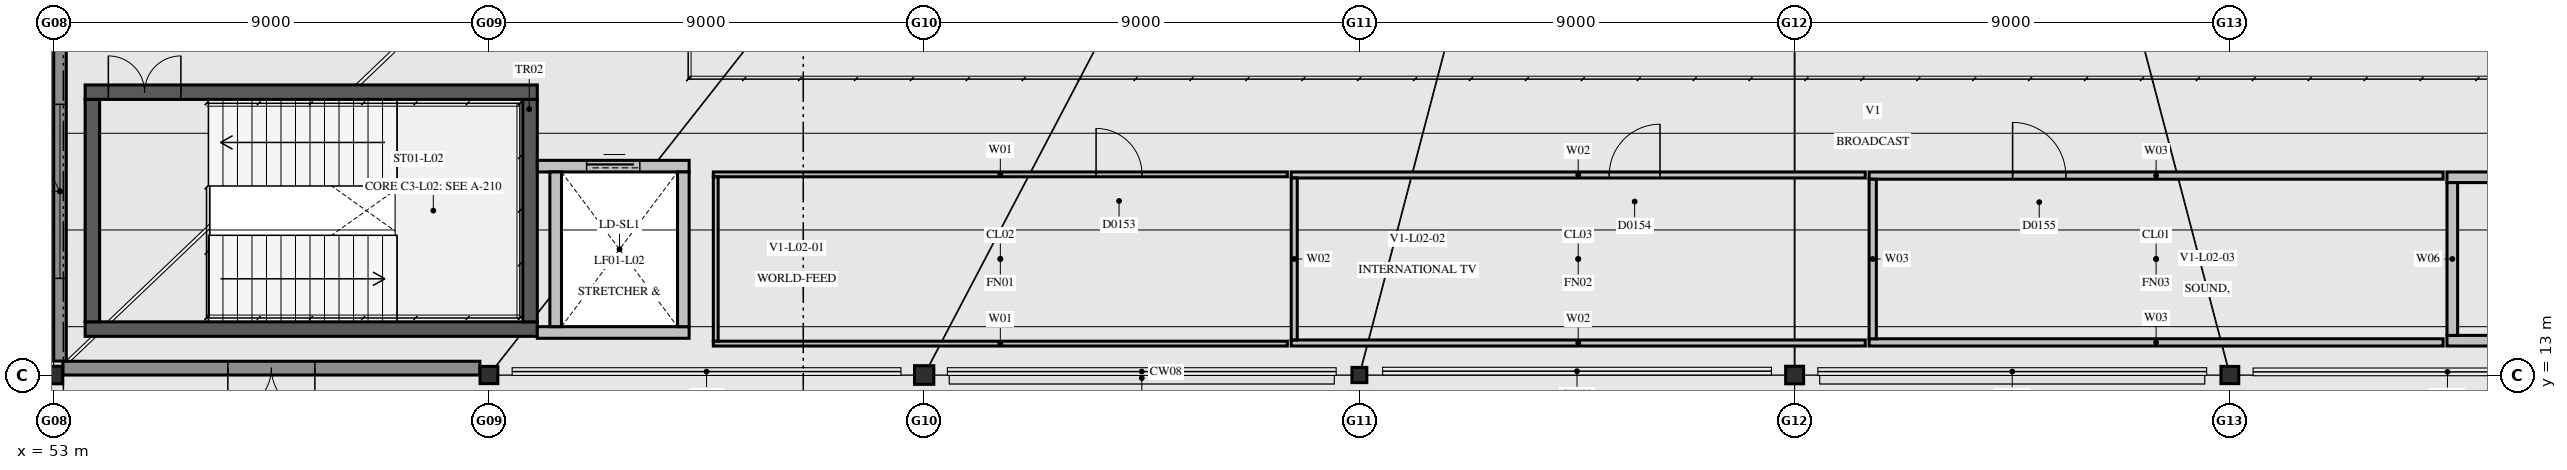
"""IFC4 building model, lengths in metres.
Left out: names, types, materials, properties, quantities, classifications, styles, units other than length and angle.
Written with IfcOpenShell. Run it as: python <this file> out.ifc"""

import sys

from ifc_helpers import new_model, si_unit, direction, frame, frame_2d, origin, origin_2d, place, context, subcontext, project, spatial, rectangle, i_section, extrude, element, fill, save


model = new_model("IFC4")
c1 = context("Model", 3, precision=1e-05, world=origin(), true_north=direction((0.0, 1.0)))
c2 = subcontext(c1, "Body", "Model", "MODEL_VIEW")
j1 = project(units=[si_unit("LENGTHUNIT", "METRE"), si_unit("PLANEANGLEUNIT", "RADIAN")], contexts=[c1])
p1 = place(None, origin())
s1 = spatial("IfcSite", under=j1, at=p1, CompositionType="ELEMENT")
p2 = place(p1, origin())
s2 = spatial("IfcBuilding", under=s1, at=p2, CompositionType="ELEMENT")
p3 = place(p2, frame((0.0, 0.0, 10.2)))
s3 = spatial("IfcBuildingStorey", under=s2, at=p3, CompositionType="ELEMENT", Elevation=10.2)
p4 = place(p3, frame((53.65, 13.95, 0.0), z_axis=(0.0, 0.0, 1.0), x_axis=(1.0, 0.0, 0.0)))
e1 = element("IfcWall", 1, at=p4, inside=s3, PredefinedType="SHEAR", context=c2, shape_type="SweptSolid", body=[
    extrude(rectangle(XDim=9.35, YDim=0.3, at=frame_2d((4.675, 0.0))), origin(), (0.0, 0.0, 1.0), 4.3),
])
p5 = place(p3, frame((53.65, 18.85, 0.0), z_axis=(0.0, 0.0, 1.0), x_axis=(1.0, 0.0, 0.0)))
e2 = element("IfcWall", 2, at=p5, inside=s3, PredefinedType="SHEAR", context=c2, shape_type="SweptSolid", body=[
    extrude(rectangle(XDim=9.35, YDim=0.3, at=frame_2d((4.675, 0.0))), origin(), (0.0, 0.0, 1.0), 4.3),
])
p6 = place(p5, frame((0.48, 0.0, 0.0)))
e3 = element("IfcOpeningElement", 3, at=p6, cuts=e2, PredefinedType="OPENING", context=c2, shape_type="SweptSolid", body=[
    extrude(rectangle(XDim=1.5, YDim=2.3, at=frame_2d((0.75, 1.15))), frame((0.0, 0.162, 0.0), z_axis=(0.0, -1.0, 0.0), x_axis=(1.0, 0.0, 0.0)), (0.0, 0.0, 1.0), 0.324),
])
for number, where, z_axis, x_axis in (
    (4, (53.8, 14.1, 0.0), (0.0, 0.0, 1.0), (0.0, 1.0, 0.0)),
    (5, (62.85, 14.1, 0.0), (0.0, 0.0, 1.0), (0.0, 1.0, 0.0)),
):
    element("IfcWall", number, at=place(p3, frame(where, z_axis=z_axis, x_axis=x_axis)), inside=s3, PredefinedType="SHEAR", context=c2, shape_type="SweptSolid", body=[
        extrude(rectangle(XDim=4.6, YDim=0.3, at=frame_2d((2.3, 0.0))), origin(), (0.0, 0.0, 1.0), 4.3),
    ])
p7 = place(p3, frame((63.0, 13.88, 0.0), z_axis=(0.0, 0.0, 1.0), x_axis=(1.0, 0.0, 0.0)))
e6 = element("IfcWall", 6, at=p7, inside=s3, PredefinedType="SOLIDWALL", context=c2, shape_type="SweptSolid", body=[
    extrude(rectangle(XDim=3.14, YDim=0.24, at=frame_2d((1.57, 0.0))), origin(), (0.0, 0.0, 1.0), 3.45),
])
p8 = place(p3, frame((63.0, 17.32, 0.0), z_axis=(0.0, 0.0, 1.0), x_axis=(1.0, 0.0, 0.0)))
e7 = element("IfcWall", 7, at=p8, inside=s3, PredefinedType="SOLIDWALL", context=c2, shape_type="SweptSolid", body=[
    extrude(rectangle(XDim=3.14, YDim=0.24, at=frame_2d((1.57, 0.0))), origin(), (0.0, 0.0, 1.0), 3.45),
])
p9 = place(p8, frame((1.02, 0.0, 0.0)))
e8 = element("IfcOpeningElement", 8, at=p9, cuts=e7, PredefinedType="OPENING", context=c2, shape_type="SweptSolid", body=[
    extrude(rectangle(XDim=1.1, YDim=2.15, at=frame_2d((0.55, 1.075))), frame((0.0, 0.132, 0.0), z_axis=(0.0, -1.0, 0.0), x_axis=(1.0, 0.0, 0.0)), (0.0, 0.0, 1.0), 0.264),
])
for number, where, z_axis, x_axis in (
    (9, (63.38, 14.0, 0.0), (0.0, 0.0, 1.0), (0.0, 1.0, 0.0)),
    (10, (66.02, 14.0, 0.0), (0.0, 0.0, 1.0), (0.0, 1.0, 0.0)),
):
    element("IfcWall", number, at=place(p3, frame(where, z_axis=z_axis, x_axis=x_axis)), inside=s3, PredefinedType="SOLIDWALL", context=c2, shape_type="SweptSolid", body=[
        extrude(rectangle(XDim=3.2, YDim=0.24, at=frame_2d((1.6, 0.0))), origin(), (0.0, 0.0, 1.0), 3.45),
    ])
p10 = place(p3, frame((53.0, 13.0, 0.0), z_axis=(0.0, 0.0, 1.0), x_axis=(1.0, 0.0, 0.0)))
e11 = element("IfcColumn", 11, at=p10, inside=s3, PredefinedType="COLUMN", context=c2, shape_type="SweptSolid", body=[
    extrude(i_section(OverallWidth=0.371, OverallDepth=0.363, WebThickness=0.013, FlangeThickness=0.022, FilletRadius=0.014, at=origin_2d()), origin(), (0.0, 0.0, 1.0), 4.35),
])
p11 = place(p3, frame((62.0, 13.0, 0.0), z_axis=(0.0, 0.0, 1.0), x_axis=(1.0, 0.0, 0.0)))
e12 = element("IfcColumn", 12, at=p11, inside=s3, PredefinedType="COLUMN", context=c2, shape_type="SweptSolid", body=[
    extrude(i_section(OverallWidth=0.368, OverallDepth=0.356, WebThickness=0.011, FlangeThickness=0.018, FilletRadius=0.014, at=origin_2d()), origin(), (0.0, 0.0, 1.0), 4.35),
])
p12 = place(p3, frame((71.0, 13.0, 0.0), z_axis=(0.0, 0.0, 1.0), x_axis=(1.0, 0.0, 0.0)))
e13 = element("IfcColumn", 13, at=p12, inside=s3, PredefinedType="COLUMN", context=c2, shape_type="SweptSolid", body=[
    extrude(i_section(OverallWidth=0.399, OverallDepth=0.386, WebThickness=0.021, FlangeThickness=0.033, FilletRadius=0.014, at=origin_2d()), origin(), (0.0, 0.0, 1.0), 4.35),
])
p13 = place(p3, frame((80.0, 13.0, 0.0), z_axis=(0.0, 0.0, 1.0), x_axis=(1.0, 0.0, 0.0)))
e14 = element("IfcColumn", 14, at=p13, inside=s3, PredefinedType="COLUMN", context=c2, shape_type="SweptSolid", body=[
    extrude(i_section(OverallWidth=0.307, OverallDepth=0.315, WebThickness=0.012, FlangeThickness=0.019, FilletRadius=0.014, at=origin_2d()), origin(), (0.0, 0.0, 1.0), 4.35),
])
p14 = place(p3, frame((89.0, 13.0, 0.0), z_axis=(0.0, 0.0, 1.0), x_axis=(1.0, 0.0, 0.0)))
e15 = element("IfcColumn", 15, at=p14, inside=s3, PredefinedType="COLUMN", context=c2, shape_type="SweptSolid", body=[
    extrude(i_section(OverallWidth=0.371, OverallDepth=0.363, WebThickness=0.013, FlangeThickness=0.022, FilletRadius=0.014, at=origin_2d()), origin(), (0.0, 0.0, 1.0), 4.35),
])
p15 = place(p3, frame((98.0, 13.0, 0.0), z_axis=(0.0, 0.0, 1.0), x_axis=(1.0, 0.0, 0.0)))
e16 = element("IfcColumn", 16, at=p15, inside=s3, PredefinedType="COLUMN", context=c2, shape_type="SweptSolid", body=[
    extrude(i_section(OverallWidth=0.368, OverallDepth=0.356, WebThickness=0.011, FlangeThickness=0.018, FilletRadius=0.014, at=origin_2d()), origin(), (0.0, 0.0, 1.0), 4.35),
])
p16 = place(p3, frame((66.64, 13.65, 0.0), z_axis=(0.0, 0.0, 1.0), x_axis=(1.0, 0.0, 0.0)))
e17 = element("IfcWall", 17, at=p16, inside=s3, PredefinedType="PARTITIONING", context=c2, shape_type="SweptSolid", body=[
    extrude(rectangle(XDim=11.87, YDim=0.1, at=frame_2d((5.935, 0.0))), origin(), (0.0, 0.0, 1.0), 4.135),
])
p17 = place(p3, frame((66.64, 17.15, 0.0), z_axis=(0.0, 0.0, 1.0), x_axis=(1.0, 0.0, 0.0)))
e18 = element("IfcWall", 18, at=p17, inside=s3, PredefinedType="PARTITIONING", context=c2, shape_type="SweptSolid", body=[
    extrude(rectangle(XDim=11.87, YDim=0.1, at=frame_2d((5.935, 0.0))), origin(), (0.0, 0.0, 1.0), 4.135),
])
p18 = place(p17, frame((7.915, 0.0, 0.0)))
e19 = element("IfcOpeningElement", 19, at=p18, cuts=e18, PredefinedType="OPENING", context=c2, shape_type="SweptSolid", body=[
    extrude(rectangle(XDim=0.95, YDim=2.15, at=frame_2d((0.475, 1.075))), frame((0.0, 0.062, 0.0), z_axis=(0.0, -1.0, 0.0), x_axis=(1.0, 0.0, 0.0)), (0.0, 0.0, 1.0), 0.124),
])
p19 = place(p3, frame((66.69, 13.7, 0.0), z_axis=(0.0, 0.0, 1.0), x_axis=(0.0, 1.0, 0.0)))
e20 = element("IfcWall", 20, at=p19, inside=s3, PredefinedType="PARTITIONING", context=c2, shape_type="SweptSolid", body=[
    extrude(rectangle(XDim=3.4, YDim=0.1, at=frame_2d((1.7, 0.0))), origin(), (0.0, 0.0, 1.0), 4.135),
])
p20 = place(p3, frame((78.59, 13.663, 0.0), z_axis=(0.0, 0.0, 1.0), x_axis=(1.0, 0.0, 0.0)))
e21 = element("IfcWall", 21, at=p20, inside=s3, PredefinedType="PARTITIONING", context=c2, shape_type="SweptSolid", body=[
    extrude(rectangle(XDim=11.87, YDim=0.125, at=frame_2d((5.935, 0.0))), origin(), (0.0, 0.0, 1.0), 4.135),
])
p21 = place(p3, frame((78.59, 17.137, 0.0), z_axis=(0.0, 0.0, 1.0), x_axis=(1.0, 0.0, 0.0)))
e22 = element("IfcWall", 22, at=p21, inside=s3, PredefinedType="PARTITIONING", context=c2, shape_type="SweptSolid", body=[
    extrude(rectangle(XDim=11.87, YDim=0.125, at=frame_2d((5.935, 0.0))), origin(), (0.0, 0.0, 1.0), 4.135),
])
p22 = place(p21, frame((6.576, 0.0, 0.0)))
e23 = element("IfcOpeningElement", 23, at=p22, cuts=e22, PredefinedType="OPENING", context=c2, shape_type="SweptSolid", body=[
    extrude(rectangle(XDim=1.05, YDim=2.15, at=frame_2d((0.525, 1.075))), frame((0.0, 0.074, 0.0), z_axis=(0.0, -1.0, 0.0), x_axis=(1.0, 0.0, 0.0)), (0.0, 0.0, 1.0), 0.149),
])
p23 = place(p3, frame((78.653, 13.725, 0.0), z_axis=(0.0, 0.0, 1.0), x_axis=(0.0, 1.0, 0.0)))
e24 = element("IfcWall", 24, at=p23, inside=s3, PredefinedType="PARTITIONING", context=c2, shape_type="SweptSolid", body=[
    extrude(rectangle(XDim=3.35, YDim=0.125, at=frame_2d((1.675, 0.0))), origin(), (0.0, 0.0, 1.0), 4.135),
])
p24 = place(p3, frame((90.54, 13.675, 0.0), z_axis=(0.0, 0.0, 1.0), x_axis=(1.0, 0.0, 0.0)))
e25 = element("IfcWall", 25, at=p24, inside=s3, PredefinedType="PARTITIONING", context=c2, shape_type="SweptSolid", body=[
    extrude(rectangle(XDim=11.87, YDim=0.15, at=frame_2d((5.935, 0.0))), origin(), (0.0, 0.0, 1.0), 4.135),
])
p25 = place(p3, frame((90.54, 17.125, 0.0), z_axis=(0.0, 0.0, 1.0), x_axis=(1.0, 0.0, 0.0)))
e26 = element("IfcWall", 26, at=p25, inside=s3, PredefinedType="PARTITIONING", context=c2, shape_type="SweptSolid", body=[
    extrude(rectangle(XDim=11.87, YDim=0.15, at=frame_2d((5.935, 0.0))), origin(), (0.0, 0.0, 1.0), 4.135),
])
p26 = place(p25, frame((2.968, 0.0, 0.0)))
e27 = element("IfcOpeningElement", 27, at=p26, cuts=e26, PredefinedType="OPENING", context=c2, shape_type="SweptSolid", body=[
    extrude(rectangle(XDim=1.1, YDim=2.25, at=frame_2d((0.55, 1.125))), frame((0.0, 0.087, 0.0), z_axis=(0.0, -1.0, 0.0), x_axis=(1.0, 0.0, 0.0)), (0.0, 0.0, 1.0), 0.174),
])
p27 = place(p3, frame((90.615, 13.75, 0.0), z_axis=(0.0, 0.0, 1.0), x_axis=(0.0, 1.0, 0.0)))
e28 = element("IfcWall", 28, at=p27, inside=s3, PredefinedType="PARTITIONING", context=c2, shape_type="SweptSolid", body=[
    extrude(rectangle(XDim=3.3, YDim=0.15, at=frame_2d((1.65, 0.0))), origin(), (0.0, 0.0, 1.0), 4.135),
])
p28 = place(p3, frame((102.49, 13.71, 0.0), z_axis=(0.0, 0.0, 1.0), x_axis=(1.0, 0.0, 0.0)))
e29 = element("IfcWall", 29, at=p28, inside=s3, PredefinedType="PLUMBINGWALL", context=c2, shape_type="SweptSolid", body=[
    extrude(rectangle(XDim=11.87, YDim=0.22, at=frame_2d((5.935, 0.0))), origin(), (0.0, 0.0, 1.0), 4.135),
])
p29 = place(p3, frame((102.49, 17.09, 0.0), z_axis=(0.0, 0.0, 1.0), x_axis=(1.0, 0.0, 0.0)))
e30 = element("IfcWall", 30, at=p29, inside=s3, PredefinedType="PLUMBINGWALL", context=c2, shape_type="SweptSolid", body=[
    extrude(rectangle(XDim=11.87, YDim=0.22, at=frame_2d((5.935, 0.0))), origin(), (0.0, 0.0, 1.0), 4.135),
])
p30 = place(p29, frame((7.84, 0.0, 0.0)))
e31 = element("IfcOpeningElement", 31, at=p30, cuts=e30, PredefinedType="OPENING", context=c2, shape_type="SweptSolid", body=[
    extrude(rectangle(XDim=1.05, YDim=2.15, at=frame_2d((0.525, 1.075))), frame((0.0, 0.122, 0.0), z_axis=(0.0, -1.0, 0.0), x_axis=(1.0, 0.0, 0.0)), (0.0, 0.0, 1.0), 0.244),
])
p31 = place(p3, frame((102.6, 13.82, 0.0), z_axis=(0.0, 0.0, 1.0), x_axis=(0.0, 1.0, 0.0)))
e32 = element("IfcWall", 32, at=p31, inside=s3, PredefinedType="PLUMBINGWALL", context=c2, shape_type="SweptSolid", body=[
    extrude(rectangle(XDim=3.16, YDim=0.22, at=frame_2d((1.58, 0.0))), origin(), (0.0, 0.0, 1.0), 4.135),
])
p32 = place(p3, frame((53.189, 13.143, 0.0), z_axis=(0.0, 0.0, 1.0), x_axis=(1.0, 0.0, 0.0)))
e33 = element("IfcWall", 33, at=p32, inside=s3, PredefinedType="SOLIDWALL", context=c2, shape_type="SweptSolid", body=[
    extrude(rectangle(XDim=8.623, YDim=0.285, at=frame_2d((4.311, 0.0))), origin(), (0.0, 0.0, 1.0), 3.86),
])
p33 = place(p32, frame((3.411, 0.0, 0.0)))
e34 = element("IfcOpeningElement", 34, at=p33, cuts=e33, PredefinedType="OPENING", context=c2, shape_type="SweptSolid", body=[
    extrude(rectangle(XDim=1.8, YDim=2.4, at=frame_2d((0.9, 1.2))), frame((0.0, 0.154, 0.0), z_axis=(0.0, -1.0, 0.0), x_axis=(1.0, 0.0, 0.0)), (0.0, 0.0, 1.0), 0.309),
])
p34 = place(p3, frame((53.13, 13.289, 0.0), z_axis=(0.0, 0.0, 1.0), x_axis=(0.0, 1.0, 0.0)))
e35 = element("IfcWall", 35, at=p34, inside=s3, PredefinedType="SOLIDWALL", context=c2, shape_type="SweptSolid", body=[
    extrude(rectangle(XDim=7.021, YDim=0.26, at=frame_2d((3.51, 0.0))), origin(), (0.0, 0.0, 1.0), 2.648),
])
p35 = place(p34, frame((1.71, 0.0, 0.689)))
e36 = element("IfcOpeningElement", 36, at=p35, cuts=e35, PredefinedType="OPENING", context=c2, shape_type="SweptSolid", body=[
    extrude(rectangle(XDim=3.6, YDim=1.8, at=frame_2d((1.8, 0.9))), frame((0.0, 0.142, 0.0), z_axis=(0.0, -1.0, 0.0), x_axis=(1.0, 0.0, 0.0)), (0.0, 0.0, 1.0), 0.284),
])
p36 = place(p6, frame((1.5, 0.0, 0.0), z_axis=(0.0, 0.0, 1.0), x_axis=(-1.0, 0.0, 0.0)))
e37 = element("IfcDoor", 37, at=p36, inside=s3, OperationType="DOUBLE_DOOR_SINGLE_SWING", PredefinedType="DOOR", context=c2, shape_type="SweptSolid", body=[
    extrude(rectangle(XDim=1.5, YDim=2.3, at=frame_2d((0.75, 1.15))), frame((0.0, 0.025, 0.0), z_axis=(0.0, -1.0, 0.0), x_axis=(1.0, 0.0, 0.0)), (0.0, 0.0, 1.0), 0.05),
])
fill(e3, e37)
p37 = place(p18, frame((0.95, 0.0, 0.0), z_axis=(0.0, 0.0, 1.0), x_axis=(-1.0, 0.0, 0.0)))
e38 = element("IfcDoor", 38, at=p37, inside=s3, OperationType="SINGLE_SWING_LEFT", PredefinedType="DOOR", context=c2, shape_type="SweptSolid", body=[
    extrude(rectangle(XDim=0.95, YDim=2.15, at=frame_2d((0.475, 1.075))), frame((0.0, 0.025, 0.0), z_axis=(0.0, -1.0, 0.0), x_axis=(1.0, 0.0, 0.0)), (0.0, 0.0, 1.0), 0.05),
])
fill(e19, e38)
p38 = place(p22, frame((1.05, 0.0, 0.0), z_axis=(0.0, 0.0, 1.0), x_axis=(-1.0, 0.0, 0.0)))
e39 = element("IfcDoor", 39, at=p38, inside=s3, OperationType="SINGLE_SWING_RIGHT", PredefinedType="DOOR", context=c2, shape_type="SweptSolid", body=[
    extrude(rectangle(XDim=1.05, YDim=2.15, at=frame_2d((0.525, 1.075))), frame((0.0, 0.025, 0.0), z_axis=(0.0, -1.0, 0.0), x_axis=(1.0, 0.0, 0.0)), (0.0, 0.0, 1.0), 0.05),
])
fill(e23, e39)
p39 = place(p26, frame((1.1, 0.0, 0.0), z_axis=(0.0, 0.0, 1.0), x_axis=(-1.0, 0.0, 0.0)))
e40 = element("IfcDoor", 40, at=p39, inside=s3, OperationType="SINGLE_SWING_LEFT", PredefinedType="DOOR", context=c2, shape_type="SweptSolid", body=[
    extrude(rectangle(XDim=1.1, YDim=2.25, at=frame_2d((0.55, 1.125))), frame((0.0, 0.025, 0.0), z_axis=(0.0, -1.0, 0.0), x_axis=(1.0, 0.0, 0.0)), (0.0, 0.0, 1.0), 0.05),
])
fill(e27, e40)
p40 = place(p33, frame((1.8, 0.0, 0.0), z_axis=(0.0, 0.0, 1.0), x_axis=(-1.0, 0.0, 0.0)))
e41 = element("IfcDoor", 41, at=p40, inside=s3, OperationType="DOUBLE_DOOR_SINGLE_SWING", PredefinedType="DOOR", context=c2, shape_type="SweptSolid", body=[
    extrude(rectangle(XDim=1.8, YDim=2.4, at=frame_2d((0.9, 1.2))), frame((0.0, 0.025, 0.0), z_axis=(0.0, -1.0, 0.0), x_axis=(1.0, 0.0, 0.0)), (0.0, 0.0, 1.0), 0.05),
])
fill(e34, e41)
p41 = place(p35, origin())
e42 = element("IfcWindow", 42, at=p41, inside=s3, PartitioningType="SINGLE_PANEL", PredefinedType="WINDOW", context=c2, shape_type="SweptSolid", body=[
    extrude(rectangle(XDim=3.6, YDim=1.8, at=frame_2d((1.8, 0.9))), frame((0.0, 0.03, 0.0), z_axis=(0.0, -1.0, 0.0), x_axis=(1.0, 0.0, 0.0)), (0.0, 0.0, 1.0), 0.06),
])
fill(e36, e42)
p42 = place(p9, origin())
e43 = element("IfcDoor", 43, at=p42, inside=s3, OperationType="SLIDING_TO_RIGHT", PredefinedType="USERDEFINED", context=c2, shape_type="SweptSolid", body=[
    extrude(rectangle(XDim=1.1, YDim=2.15, at=frame_2d((0.55, 1.075))), frame((0.0, 0.025, 0.0), z_axis=(0.0, -1.0, 0.0), x_axis=(1.0, 0.0, 0.0)), (0.0, 0.0, 1.0), 0.05),
])
fill(e8, e43)
save(model, sys.argv[1])
